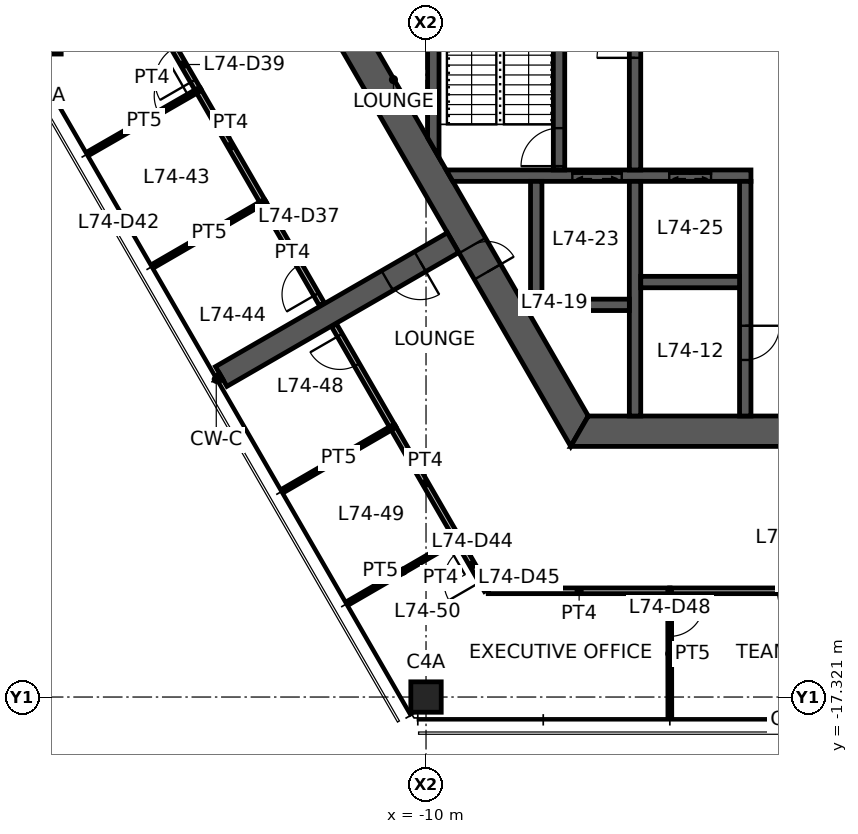
"""IFC4 building model, lengths in metres.
Left out: names, types, materials, properties, quantities, classifications, styles, units other than length and angle.
Written with IfcOpenShell. Run it as: python <this file> out.ifc"""

import sys

from ifc_helpers import new_model, si_unit, direction, frame, frame_2d, origin, origin_2d, place, context, subcontext, project, spatial, polyline, rectangle, hollow_rectangle, outline, extrude, element, fill, save


model = new_model("IFC4")
c1 = context("Model", 3, precision=1e-05, world=origin(), true_north=direction((0.0, 1.0)))
c2 = subcontext(c1, "Body", "Model", "MODEL_VIEW")
j1 = project(units=[si_unit("LENGTHUNIT", "METRE"), si_unit("PLANEANGLEUNIT", "RADIAN")], contexts=[c1])
p1 = place(None, origin())
s1 = spatial("IfcSite", under=j1, at=p1, CompositionType="ELEMENT")
p2 = place(p1, origin())
s2 = spatial("IfcBuilding", under=s1, at=p2, CompositionType="ELEMENT")
p3 = place(p2, frame((0.0, 0.0, 294.7)))
s3 = spatial("IfcBuildingStorey", under=s2, at=p3, CompositionType="ELEMENT", Elevation=294.7)
for number, where, z_axis, x_axis in (
    (1, (-20.0, 0.0, 0.0), (0.0, 0.0, 1.0), (1.0, 0.0, 0.0)),
    (2, (-10.0, -17.321, 0.0), (0.0, 0.0, 1.0), (1.0, 0.0, 0.0)),
):
    element("IfcColumn", number, at=place(p3, frame(where, z_axis=z_axis, x_axis=x_axis)), inside=s3, PredefinedType="COLUMN", context=c2, shape_type="SweptSolid", body=[
        extrude(hollow_rectangle(XDim=0.8, YDim=0.8, WallThickness=0.04, at=origin_2d()), origin(), (0.0, 0.0, 1.0), 3.9),
    ])
p4 = place(p3, frame((-11.922, 0.0, 0.0), z_axis=(0.0, 0.0, 1.0), x_axis=(0.500004296715, -0.866022923061, 0.0)))
e3 = element("IfcWall", 3, at=p4, inside=s3, PredefinedType="SHEAR", context=c2, shape_type="SweptSolid", body=[
    extrude(outline(polyline([(-0.231, -0.4), (6.281, -0.4), (7.081, -0.4), (12.153, -0.4), (11.691, 0.4), (7.081, 0.4), (6.281, 0.4), (0.231, 0.4), (-0.231, -0.4)])), origin(), (0.0, 0.0, 1.0), 3.9),
])
p5 = place(p4, frame((6.281, 0.0, 0.0)))
e4 = element("IfcOpeningElement", 4, at=p5, cuts=e3, PredefinedType="OPENING", context=c2, shape_type="SweptSolid", body=[
    extrude(rectangle(XDim=0.8, YDim=2.1, at=frame_2d((0.4, 1.05))), frame((0.0, 0.41, 0.0), z_axis=(0.0, -1.0, 0.0), x_axis=(1.0, 0.0, 0.0)), (0.0, 0.0, 1.0), 0.82),
])
p6 = place(p3, frame((-5.961, -10.325, 0.0), z_axis=(0.0, 0.0, 1.0), x_axis=(1.0, 0.0, 0.0)))
e5 = element("IfcWall", 5, at=p6, inside=s3, PredefinedType="SHEAR", context=c2, shape_type="SweptSolid", body=[
    extrude(outline(polyline([(-0.231, -0.4), (5.461, -0.4), (6.461, -0.4), (12.153, -0.4), (11.691, 0.4), (6.461, 0.4), (5.461, 0.4), (0.231, 0.4), (-0.231, -0.4)])), origin(), (0.0, 0.0, 1.0), 3.9),
])
p7 = place(p6, frame((5.461, 0.0, 0.0)))
e6 = element("IfcOpeningElement", 6, at=p7, cuts=e5, PredefinedType="OPENING", context=c2, shape_type="SweptSolid", body=[
    extrude(rectangle(XDim=1.0, YDim=2.1, at=frame_2d((0.5, 1.05))), frame((0.0, 0.41, 0.0), z_axis=(0.0, -1.0, 0.0), x_axis=(1.0, 0.0, 0.0)), (0.0, 0.0, 1.0), 0.82),
])
p8 = place(p3, frame((-9.288, -5.363, 0.0), z_axis=(0.0, 0.0, 1.0), x_axis=(-0.866027473358, -0.499996415376, 0.0)))
e7 = element("IfcWall", 7, at=p8, inside=s3, PredefinedType="SHEAR", context=c2, shape_type="SweptSolid", body=[
    extrude(rectangle(XDim=7.045, YDim=0.6, at=frame_2d((3.523, 0.0))), origin(), (0.0, 0.0, 1.0), 3.9),
])
p9 = place(p8, frame((1.0, 0.0, 0.0)))
e8 = element("IfcOpeningElement", 8, at=p9, cuts=e7, PredefinedType="OPENING", context=c2, shape_type="SweptSolid", body=[
    extrude(rectangle(XDim=1.0, YDim=2.1, at=frame_2d((0.5, 1.05))), frame((0.0, 0.31, 0.0), z_axis=(0.0, -1.0, 0.0), x_axis=(1.0, 0.0, 0.0)), (0.0, 0.0, 1.0), 0.62),
])
p10 = place(p3, frame((-9.382, -3.6, 0.0), z_axis=(0.0, 0.0, 1.0), x_axis=(1.0, 0.0, 0.0)))
e9 = element("IfcWall", 9, at=p10, inside=s3, PredefinedType="SHEAR", context=c2, shape_type="SweptSolid", body=[
    extrude(outline(polyline([(0.087, -0.15), (3.232, -0.15), (4.532, -0.15), (5.782, -0.15), (6.882, -0.15), (7.932, -0.15), (7.932, 0.15), (6.882, 0.15), (5.782, 0.15), (4.532, 0.15), (3.232, 0.15), (-0.087, 0.15), (0.087, -0.15)])), origin(), (0.0, 0.0, 1.0), 3.9),
])
p11 = place(p10, frame((5.782, 0.0, 0.0)))
e10 = element("IfcOpeningElement", 10, at=p11, cuts=e9, PredefinedType="OPENING", context=c2, shape_type="SweptSolid", body=[
    extrude(rectangle(XDim=1.1, YDim=2.1, at=frame_2d((0.55, 1.05))), frame((0.0, 0.16, 0.0), z_axis=(0.0, -1.0, 0.0), x_axis=(1.0, 0.0, 0.0)), (0.0, 0.0, 1.0), 0.32),
])
p12 = place(p10, frame((3.232, 0.0, 0.0)))
e11 = element("IfcOpeningElement", 11, at=p12, cuts=e9, PredefinedType="OPENING", context=c2, shape_type="SweptSolid", body=[
    extrude(rectangle(XDim=1.3, YDim=2.1, at=frame_2d((0.65, 1.05))), frame((0.0, 0.16, 0.0), z_axis=(0.0, -1.0, 0.0), x_axis=(1.0, 0.0, 0.0)), (0.0, 0.0, 1.0), 0.32),
])
p13 = place(p3, frame((-1.6, -3.75, 0.0), z_axis=(0.0, 0.0, 1.0), x_axis=(0.0, -1.0, 0.0)))
e12 = element("IfcWall", 12, at=p13, inside=s3, PredefinedType="SHEAR", context=c2, shape_type="SweptSolid", body=[
    extrude(rectangle(XDim=6.175, YDim=0.3, at=frame_2d((3.087, 0.0))), origin(), (0.0, 0.0, 1.0), 3.9),
])
p14 = place(p13, frame((3.8, 0.0, 0.0)))
e13 = element("IfcOpeningElement", 13, at=p14, cuts=e12, PredefinedType="OPENING", context=c2, shape_type="SweptSolid", body=[
    extrude(rectangle(XDim=0.9, YDim=2.1, at=frame_2d((0.45, 1.05))), frame((0.0, 0.16, 0.0), z_axis=(0.0, -1.0, 0.0), x_axis=(1.0, 0.0, 0.0)), (0.0, 0.0, 1.0), 0.32),
])
p15 = place(p3, frame((-4.5, -3.45, 0.0), z_axis=(0.0, 0.0, 1.0), x_axis=(0.0, 1.0, 0.0)))
e14 = element("IfcWall", 14, at=p15, inside=s3, PredefinedType="SHEAR", context=c2, shape_type="SweptSolid", body=[
    extrude(rectangle(XDim=6.9, YDim=0.3, at=frame_2d((3.45, 0.0))), origin(), (0.0, 0.0, 1.0), 3.9),
])
p16 = place(p15, frame((2.95, 0.0, 0.0)))
e15 = element("IfcOpeningElement", 15, at=p16, cuts=e14, PredefinedType="OPENING", context=c2, shape_type="SweptSolid", body=[
    extrude(rectangle(XDim=1.0, YDim=2.1, at=frame_2d((0.5, 1.05))), frame((0.0, 0.16, 0.0), z_axis=(0.0, -1.0, 0.0), x_axis=(1.0, 0.0, 0.0)), (0.0, 0.0, 1.0), 0.32),
])
p17 = place(p3, frame((-6.5, -3.45, 0.0), z_axis=(0.0, 0.0, 1.0), x_axis=(0.0, 1.0, 0.0)))
e16 = element("IfcWall", 16, at=p17, inside=s3, PredefinedType="SHEAR", context=c2, shape_type="SweptSolid", body=[
    extrude(rectangle(XDim=6.9, YDim=0.3, at=frame_2d((3.45, 0.0))), origin(), (0.0, 0.0, 1.0), 3.9),
])
p18 = place(p17, frame((0.1, 0.0, 0.0)))
e17 = element("IfcOpeningElement", 17, at=p18, cuts=e16, PredefinedType="OPENING", context=c2, shape_type="SweptSolid", body=[
    extrude(rectangle(XDim=1.0, YDim=2.1, at=frame_2d((0.5, 1.05))), frame((0.0, 0.16, 0.0), z_axis=(0.0, -1.0, 0.0), x_axis=(1.0, 0.0, 0.0)), (0.0, 0.0, 1.0), 0.32),
])
p19 = place(p3, frame((-4.5, -3.75, 0.0), z_axis=(0.0, 0.0, 1.0), x_axis=(0.0, -1.0, 0.0)))
e18 = element("IfcWall", 18, at=p19, inside=s3, PredefinedType="SHEAR", context=c2, shape_type="SweptSolid", body=[
    extrude(rectangle(XDim=6.175, YDim=0.3, at=frame_2d((3.087, 0.0))), origin(), (0.0, 0.0, 1.0), 3.9),
])
for number, where, z_axis, x_axis in (
    (19, (-4.35, -6.4, 0.0), (0.0, 0.0, 1.0), (1.0, 0.0, 0.0)),
    (20, (-7.25, -7.0, 0.0), (0.0, 0.0, 1.0), (1.0, 0.0, 0.0)),
):
    element("IfcWall", number, at=place(p3, frame(where, z_axis=z_axis, x_axis=x_axis)), inside=s3, PredefinedType="SHEAR", context=c2, shape_type="SweptSolid", body=[
        extrude(rectangle(XDim=2.6, YDim=0.3, at=frame_2d((1.3, 0.0))), origin(), (0.0, 0.0, 1.0), 3.9),
    ])
p20 = place(p3, frame((-7.1, -3.75, 0.0), z_axis=(0.0, 0.0, 1.0), x_axis=(0.0, -1.0, 0.0)))
e21 = element("IfcWall", 21, at=p20, inside=s3, PredefinedType="SHEAR", context=c2, shape_type="SweptSolid", body=[
    extrude(rectangle(XDim=3.1, YDim=0.3, at=frame_2d((1.55, 0.0))), origin(), (0.0, 0.0, 1.0), 3.9),
])
p21 = place(p3, frame((-9.808, -2.862, 0.0), z_axis=(0.0, 0.0, 1.0), x_axis=(0.0, 1.0, 0.0)))
e22 = element("IfcWall", 22, at=p21, inside=s3, PredefinedType="SHEAR", context=c2, shape_type="SweptSolid", body=[
    extrude(outline(polyline([(-0.26, -0.15), (5.984, -0.15), (5.465, 0.15), (0.26, 0.15), (-0.26, -0.15)])), origin(), (0.0, 0.0, 1.0), 3.9),
])
p22 = place(p3, frame((-14.284, -4.309, 0.0), z_axis=(0.0, 0.0, 1.0), x_axis=(-0.500032973541, 0.866006365664, 0.0)))
e23 = element("IfcWall", 23, at=p22, inside=s3, PredefinedType="PARTITIONING", context=c2, shape_type="SweptSolid", body=[
    extrude(rectangle(XDim=3.426, YDim=0.15, at=frame_2d((1.713, 0.0))), origin(), (0.0, 0.0, 1.0), 2.95),
])
p23 = place(p3, frame((-12.739, -6.985, 0.0), z_axis=(0.0, 0.0, 1.0), x_axis=(-0.500017819788, 0.86601511528, 0.0)))
e24 = element("IfcWall", 24, at=p23, inside=s3, PredefinedType="PARTITIONING", context=c2, shape_type="SweptSolid", body=[
    extrude(rectangle(XDim=3.101, YDim=0.15, at=frame_2d((1.55, 0.0))), origin(), (0.0, 0.0, 1.0), 2.95),
])
p24 = place(p23, frame((0.3, 0.0, 0.0)))
e25 = element("IfcOpeningElement", 25, at=p24, cuts=e24, PredefinedType="OPENING", context=c2, shape_type="SweptSolid", body=[
    extrude(rectangle(XDim=0.9, YDim=2.1, at=frame_2d((0.45, 1.05))), frame((0.0, 0.085, 0.0), z_axis=(0.0, -1.0, 0.0), x_axis=(1.0, 0.0, 0.0)), (0.0, 0.0, 1.0), 0.17),
])
p25 = place(p3, frame((-15.992, -1.351, 0.0), z_axis=(0.0, 0.0, 1.0), x_axis=(-0.500011542666, 0.866018739521, 0.0)))
e26 = element("IfcWall", 26, at=p25, inside=s3, PredefinedType="PARTITIONING", context=c2, shape_type="SweptSolid", body=[
    extrude(rectangle(XDim=1.56, YDim=0.15, at=frame_2d((0.78, 0.0))), origin(), (0.0, 0.0, 1.0), 2.95),
])
p26 = place(p25, frame((0.28, 0.0, 0.0)))
e27 = element("IfcOpeningElement", 27, at=p26, cuts=e26, PredefinedType="OPENING", context=c2, shape_type="SweptSolid", body=[
    extrude(rectangle(XDim=1.0, YDim=2.1, at=frame_2d((0.5, 1.05))), frame((0.0, 0.085, 0.0), z_axis=(0.0, -1.0, 0.0), x_axis=(1.0, 0.0, 0.0)), (0.0, 0.0, 1.0), 0.17),
])
p27 = place(p3, frame((-14.289, -4.3, 0.0), z_axis=(0.0, 0.0, 1.0), x_axis=(-0.865245913684, -0.501347692578, 0.0)))
e28 = element("IfcWall", 28, at=p27, inside=s3, PredefinedType="PARTITIONING", context=c2, shape_type="SweptSolid", body=[
    extrude(rectangle(XDim=3.275, YDim=0.1, at=frame_2d((1.638, 0.0))), origin(), (0.0, 0.0, 1.0), 2.95),
])
p28 = place(p3, frame((-18.84, -2.99, 0.0), z_axis=(0.0, 0.0, 1.0), x_axis=(0.866707153418, 0.498817311462, 0.0)))
e29 = element("IfcWall", 29, at=p28, inside=s3, PredefinedType="PARTITIONING", context=c2, shape_type="SweptSolid", body=[
    extrude(rectangle(XDim=3.286, YDim=0.1, at=frame_2d((1.643, 0.0))), origin(), (0.0, 0.0, 1.0), 2.95),
])
p29 = place(p28, frame((2.086, 0.0, 0.0)))
e30 = element("IfcOpeningElement", 30, at=p29, cuts=e29, PredefinedType="OPENING", context=c2, shape_type="SweptSolid", body=[
    extrude(rectangle(XDim=0.9, YDim=2.1, at=frame_2d((0.45, 1.05))), frame((0.0, 0.06, 0.0), z_axis=(0.0, -1.0, 0.0), x_axis=(1.0, 0.0, 0.0)), (0.0, 0.0, 1.0), 0.12),
])
p30 = place(p3, frame((-10.869, -10.225, 0.0), z_axis=(0.0, 0.0, 1.0), x_axis=(-0.499958760481, 0.866049212123, 0.0)))
e31 = element("IfcWall", 31, at=p30, inside=s3, PredefinedType="PARTITIONING", context=c2, shape_type="SweptSolid", body=[
    extrude(rectangle(XDim=3.1, YDim=0.15, at=frame_2d((1.55, 0.0))), origin(), (0.0, 0.0, 1.0), 2.95),
])
p31 = place(p30, frame((1.9, 0.0, 0.0)))
e32 = element("IfcOpeningElement", 32, at=p31, cuts=e31, PredefinedType="OPENING", context=c2, shape_type="SweptSolid", body=[
    extrude(rectangle(XDim=0.9, YDim=2.1, at=frame_2d((0.45, 1.05))), frame((0.0, 0.085, 0.0), z_axis=(0.0, -1.0, 0.0), x_axis=(1.0, 0.0, 0.0)), (0.0, 0.0, 1.0), 0.17),
])
p32 = place(p3, frame((-9.161, -13.183, 0.0), z_axis=(0.0, 0.0, 1.0), x_axis=(-0.500032973541, 0.866006365664, 0.0)))
e33 = element("IfcWall", 33, at=p32, inside=s3, PredefinedType="PARTITIONING", context=c2, shape_type="SweptSolid", body=[
    extrude(rectangle(XDim=3.426, YDim=0.15, at=frame_2d((1.713, 0.0))), origin(), (0.0, 0.0, 1.0), 2.95),
])
p33 = place(p3, frame((-8.398, -14.505, 0.0), z_axis=(0.0, 0.0, 1.0), x_axis=(-0.499933379091, 0.866063863968, 0.0)))
e34 = element("IfcWall", 34, at=p33, inside=s3, PredefinedType="PARTITIONING", context=c2, shape_type="SweptSolid", body=[
    extrude(rectangle(XDim=1.536, YDim=0.15, at=frame_2d((0.768, 0.0))), origin(), (0.0, 0.0, 1.0), 2.95),
])
p34 = place(p33, frame((0.268, 0.0, 0.0)))
e35 = element("IfcOpeningElement", 35, at=p34, cuts=e34, PredefinedType="OPENING", context=c2, shape_type="SweptSolid", body=[
    extrude(rectangle(XDim=1.0, YDim=2.1, at=frame_2d((0.5, 1.05))), frame((0.0, 0.085, 0.0), z_axis=(0.0, -1.0, 0.0), x_axis=(1.0, 0.0, 0.0)), (0.0, 0.0, 1.0), 0.17),
])
p35 = place(p3, frame((-10.874, -10.216, 0.0), z_axis=(0.0, 0.0, 1.0), x_axis=(-0.865292288087, -0.501267649243, 0.0)))
e36 = element("IfcWall", 36, at=p35, inside=s3, PredefinedType="PARTITIONING", context=c2, shape_type="SweptSolid", body=[
    extrude(rectangle(XDim=3.286, YDim=0.1, at=frame_2d((1.643, 0.0))), origin(), (0.0, 0.0, 1.0), 2.95),
])
p36 = place(p3, frame((-9.166, -13.174, 0.0), z_axis=(0.0, 0.0, 1.0), x_axis=(-0.865342122637, -0.501181614577, 0.0)))
e37 = element("IfcWall", 37, at=p36, inside=s3, PredefinedType="PARTITIONING", context=c2, shape_type="SweptSolid", body=[
    extrude(rectangle(XDim=3.311, YDim=0.1, at=frame_2d((1.655, 0.0))), origin(), (0.0, 0.0, 1.0), 2.95),
])
p37 = place(p36, frame((0.3, 0.0, 0.0)))
e38 = element("IfcOpeningElement", 38, at=p37, cuts=e37, PredefinedType="OPENING", context=c2, shape_type="SweptSolid", body=[
    extrude(rectangle(XDim=0.9, YDim=2.1, at=frame_2d((0.45, 1.05))), frame((0.0, 0.06, 0.0), z_axis=(0.0, -1.0, 0.0), x_axis=(1.0, 0.0, 0.0)), (0.0, 0.0, 1.0), 0.12),
])
p38 = place(p3, frame((-3.58, -14.525, 0.0), z_axis=(0.0, 0.0, 1.0), x_axis=(-1.0, 0.0, 0.0)))
e39 = element("IfcWall", 39, at=p38, inside=s3, PredefinedType="PARTITIONING", context=c2, shape_type="SweptSolid", body=[
    extrude(rectangle(XDim=4.783, YDim=0.15, at=frame_2d((2.392, 0.0))), origin(), (0.0, 0.0, 1.0), 2.95),
])
p39 = place(p3, frame((3.082, -14.525, 0.0), z_axis=(0.0, 0.0, 1.0), x_axis=(-1.0, 0.0, 0.0)))
e40 = element("IfcWall", 40, at=p39, inside=s3, PredefinedType="PARTITIONING", context=c2, shape_type="SweptSolid", body=[
    extrude(rectangle(XDim=6.671, YDim=0.15, at=frame_2d((3.335, 0.0))), origin(), (0.0, 0.0, 1.0), 2.95),
])
p40 = place(p39, frame((2.835, 0.0, 0.0)))
e41 = element("IfcOpeningElement", 41, at=p40, cuts=e40, PredefinedType="OPENING", context=c2, shape_type="SweptSolid", body=[
    extrude(rectangle(XDim=1.0, YDim=2.1, at=frame_2d((0.5, 1.05))), frame((0.0, 0.085, 0.0), z_axis=(0.0, -1.0, 0.0), x_axis=(1.0, 0.0, 0.0)), (0.0, 0.0, 1.0), 0.17),
])
p41 = place(p3, frame((-3.589, -14.525, 0.0), z_axis=(0.0, 0.0, 1.0), x_axis=(0.001401178566, -0.999999018349, 0.0)))
e42 = element("IfcWall", 42, at=p41, inside=s3, PredefinedType="PARTITIONING", context=c2, shape_type="SweptSolid", body=[
    extrude(rectangle(XDim=3.311, YDim=0.1, at=frame_2d((1.655, 0.0))), origin(), (0.0, 0.0, 1.0), 2.95),
])
p42 = place(p41, frame((0.3, 0.0, 0.0)))
e43 = element("IfcOpeningElement", 43, at=p42, cuts=e42, PredefinedType="OPENING", context=c2, shape_type="SweptSolid", body=[
    extrude(rectangle(XDim=0.9, YDim=2.1, at=frame_2d((0.45, 1.05))), frame((0.0, 0.06, 0.0), z_axis=(0.0, -1.0, 0.0), x_axis=(1.0, 0.0, 0.0)), (0.0, 0.0, 1.0), 0.12),
])
p43 = place(p3, frame((-15.39, -8.885, 0.0), z_axis=(0.0, 0.0, 1.0), x_axis=(-0.866622456874, -0.498964444867, 0.0)))
e44 = element("IfcWall", 44, at=p43, inside=s3, PredefinedType="PARTITIONING", context=c2, shape_type="SweptSolid", body=[
    extrude(rectangle(XDim=0.065, YDim=0.175, at=frame_2d((0.033, 0.0))), origin(), (0.0, 0.0, 1.0), 3.9),
])
p44 = place(p5, origin())
e45 = element("IfcDoor", 45, at=p44, inside=s3, OperationType="SINGLE_SWING_RIGHT", PredefinedType="DOOR", context=c2, shape_type="SweptSolid", body=[
    extrude(rectangle(XDim=0.8, YDim=2.1, at=frame_2d((0.4, 1.05))), frame((0.0, 0.025, 0.0), z_axis=(0.0, -1.0, 0.0), x_axis=(1.0, 0.0, 0.0)), (0.0, 0.0, 1.0), 0.05),
])
fill(e4, e45)
p45 = place(p16, origin())
e46 = element("IfcDoor", 46, at=p45, inside=s3, OperationType="SINGLE_SWING_LEFT", PredefinedType="DOOR", context=c2, shape_type="SweptSolid", body=[
    extrude(rectangle(XDim=1.0, YDim=2.1, at=frame_2d((0.5, 1.05))), frame((0.0, 0.025, 0.0), z_axis=(0.0, -1.0, 0.0), x_axis=(1.0, 0.0, 0.0)), (0.0, 0.0, 1.0), 0.05),
])
fill(e15, e46)
p46 = place(p18, origin())
e47 = element("IfcDoor", 47, at=p46, inside=s3, OperationType="SINGLE_SWING_LEFT", PredefinedType="DOOR", context=c2, shape_type="SweptSolid", body=[
    extrude(rectangle(XDim=1.0, YDim=2.1, at=frame_2d((0.5, 1.05))), frame((0.0, 0.025, 0.0), z_axis=(0.0, -1.0, 0.0), x_axis=(1.0, 0.0, 0.0)), (0.0, 0.0, 1.0), 0.05),
])
fill(e17, e47)
p47 = place(p14, origin())
e48 = element("IfcDoor", 48, at=p47, inside=s3, OperationType="SINGLE_SWING_LEFT", PredefinedType="DOOR", context=c2, shape_type="SweptSolid", body=[
    extrude(rectangle(XDim=0.9, YDim=2.1, at=frame_2d((0.45, 1.05))), frame((0.0, 0.025, 0.0), z_axis=(0.0, -1.0, 0.0), x_axis=(1.0, 0.0, 0.0)), (0.0, 0.0, 1.0), 0.05),
])
fill(e13, e48)
p48 = place(p9, origin())
e49 = element("IfcDoor", 49, at=p48, inside=s3, OperationType="SINGLE_SWING_LEFT", PredefinedType="DOOR", context=c2, shape_type="SweptSolid", body=[
    extrude(rectangle(XDim=1.0, YDim=2.1, at=frame_2d((0.5, 1.05))), frame((0.0, 0.025, 0.0), z_axis=(0.0, -1.0, 0.0), x_axis=(1.0, 0.0, 0.0)), (0.0, 0.0, 1.0), 0.05),
])
fill(e8, e49)
p49 = place(p24, origin())
e50 = element("IfcDoor", 50, at=p49, inside=s3, OperationType="SINGLE_SWING_LEFT", PredefinedType="DOOR", context=c2, shape_type="SweptSolid", body=[
    extrude(rectangle(XDim=0.9, YDim=2.1, at=frame_2d((0.45, 1.05))), frame((0.0, 0.025, 0.0), z_axis=(0.0, -1.0, 0.0), x_axis=(1.0, 0.0, 0.0)), (0.0, 0.0, 1.0), 0.05),
])
fill(e25, e50)
p50 = place(p26, origin())
e51 = element("IfcDoor", 51, at=p50, inside=s3, OperationType="SINGLE_SWING_LEFT", PredefinedType="DOOR", context=c2, shape_type="SweptSolid", body=[
    extrude(rectangle(XDim=1.0, YDim=2.1, at=frame_2d((0.5, 1.05))), frame((0.0, 0.025, 0.0), z_axis=(0.0, -1.0, 0.0), x_axis=(1.0, 0.0, 0.0)), (0.0, 0.0, 1.0), 0.05),
])
fill(e27, e51)
p51 = place(p29, origin())
e52 = element("IfcDoor", 52, at=p51, inside=s3, OperationType="SINGLE_SWING_RIGHT", PredefinedType="DOOR", context=c2, shape_type="SweptSolid", body=[
    extrude(rectangle(XDim=0.9, YDim=2.1, at=frame_2d((0.45, 1.05))), frame((0.0, 0.025, 0.0), z_axis=(0.0, -1.0, 0.0), x_axis=(1.0, 0.0, 0.0)), (0.0, 0.0, 1.0), 0.05),
])
fill(e30, e52)
p52 = place(p31, origin())
e53 = element("IfcDoor", 53, at=p52, inside=s3, OperationType="SINGLE_SWING_RIGHT", PredefinedType="DOOR", context=c2, shape_type="SweptSolid", body=[
    extrude(rectangle(XDim=0.9, YDim=2.1, at=frame_2d((0.45, 1.05))), frame((0.0, 0.025, 0.0), z_axis=(0.0, -1.0, 0.0), x_axis=(1.0, 0.0, 0.0)), (0.0, 0.0, 1.0), 0.05),
])
fill(e32, e53)
p53 = place(p34, origin())
e54 = element("IfcDoor", 54, at=p53, inside=s3, OperationType="SINGLE_SWING_LEFT", PredefinedType="DOOR", context=c2, shape_type="SweptSolid", body=[
    extrude(rectangle(XDim=1.0, YDim=2.1, at=frame_2d((0.5, 1.05))), frame((0.0, 0.025, 0.0), z_axis=(0.0, -1.0, 0.0), x_axis=(1.0, 0.0, 0.0)), (0.0, 0.0, 1.0), 0.05),
])
fill(e35, e54)
p54 = place(p37, origin())
e55 = element("IfcDoor", 55, at=p54, inside=s3, OperationType="SINGLE_SWING_LEFT", PredefinedType="DOOR", context=c2, shape_type="SweptSolid", body=[
    extrude(rectangle(XDim=0.9, YDim=2.1, at=frame_2d((0.45, 1.05))), frame((0.0, 0.025, 0.0), z_axis=(0.0, -1.0, 0.0), x_axis=(1.0, 0.0, 0.0)), (0.0, 0.0, 1.0), 0.05),
])
fill(e38, e55)
p55 = place(p40, origin())
e56 = element("IfcDoor", 56, at=p55, inside=s3, OperationType="SINGLE_SWING_LEFT", PredefinedType="DOOR", context=c2, shape_type="SweptSolid", body=[
    extrude(rectangle(XDim=1.0, YDim=2.1, at=frame_2d((0.5, 1.05))), frame((0.0, 0.025, 0.0), z_axis=(0.0, -1.0, 0.0), x_axis=(1.0, 0.0, 0.0)), (0.0, 0.0, 1.0), 0.05),
])
fill(e41, e56)
p56 = place(p42, origin())
e57 = element("IfcDoor", 57, at=p56, inside=s3, OperationType="SINGLE_SWING_LEFT", PredefinedType="DOOR", context=c2, shape_type="SweptSolid", body=[
    extrude(rectangle(XDim=0.9, YDim=2.1, at=frame_2d((0.45, 1.05))), frame((0.0, 0.025, 0.0), z_axis=(0.0, -1.0, 0.0), x_axis=(1.0, 0.0, 0.0)), (0.0, 0.0, 1.0), 0.05),
])
fill(e43, e57)
p57 = place(p11, origin())
e58 = element("IfcDoor", 58, at=p57, inside=s3, OperationType="DOUBLE_DOOR_SLIDING", PredefinedType="DOOR", context=c2, shape_type="SweptSolid", body=[
    extrude(rectangle(XDim=1.1, YDim=2.1, at=frame_2d((0.55, 1.05))), frame((0.0, 0.025, 0.0), z_axis=(0.0, -1.0, 0.0), x_axis=(1.0, 0.0, 0.0)), (0.0, 0.0, 1.0), 0.05),
])
fill(e10, e58)
p58 = place(p12, origin())
e59 = element("IfcDoor", 59, at=p58, inside=s3, OperationType="DOUBLE_DOOR_SLIDING", PredefinedType="DOOR", context=c2, shape_type="SweptSolid", body=[
    extrude(rectangle(XDim=1.3, YDim=2.1, at=frame_2d((0.65, 1.05))), frame((0.0, 0.025, 0.0), z_axis=(0.0, -1.0, 0.0), x_axis=(1.0, 0.0, 0.0)), (0.0, 0.0, 1.0), 0.05),
])
fill(e11, e59)
save(model, sys.argv[1])
